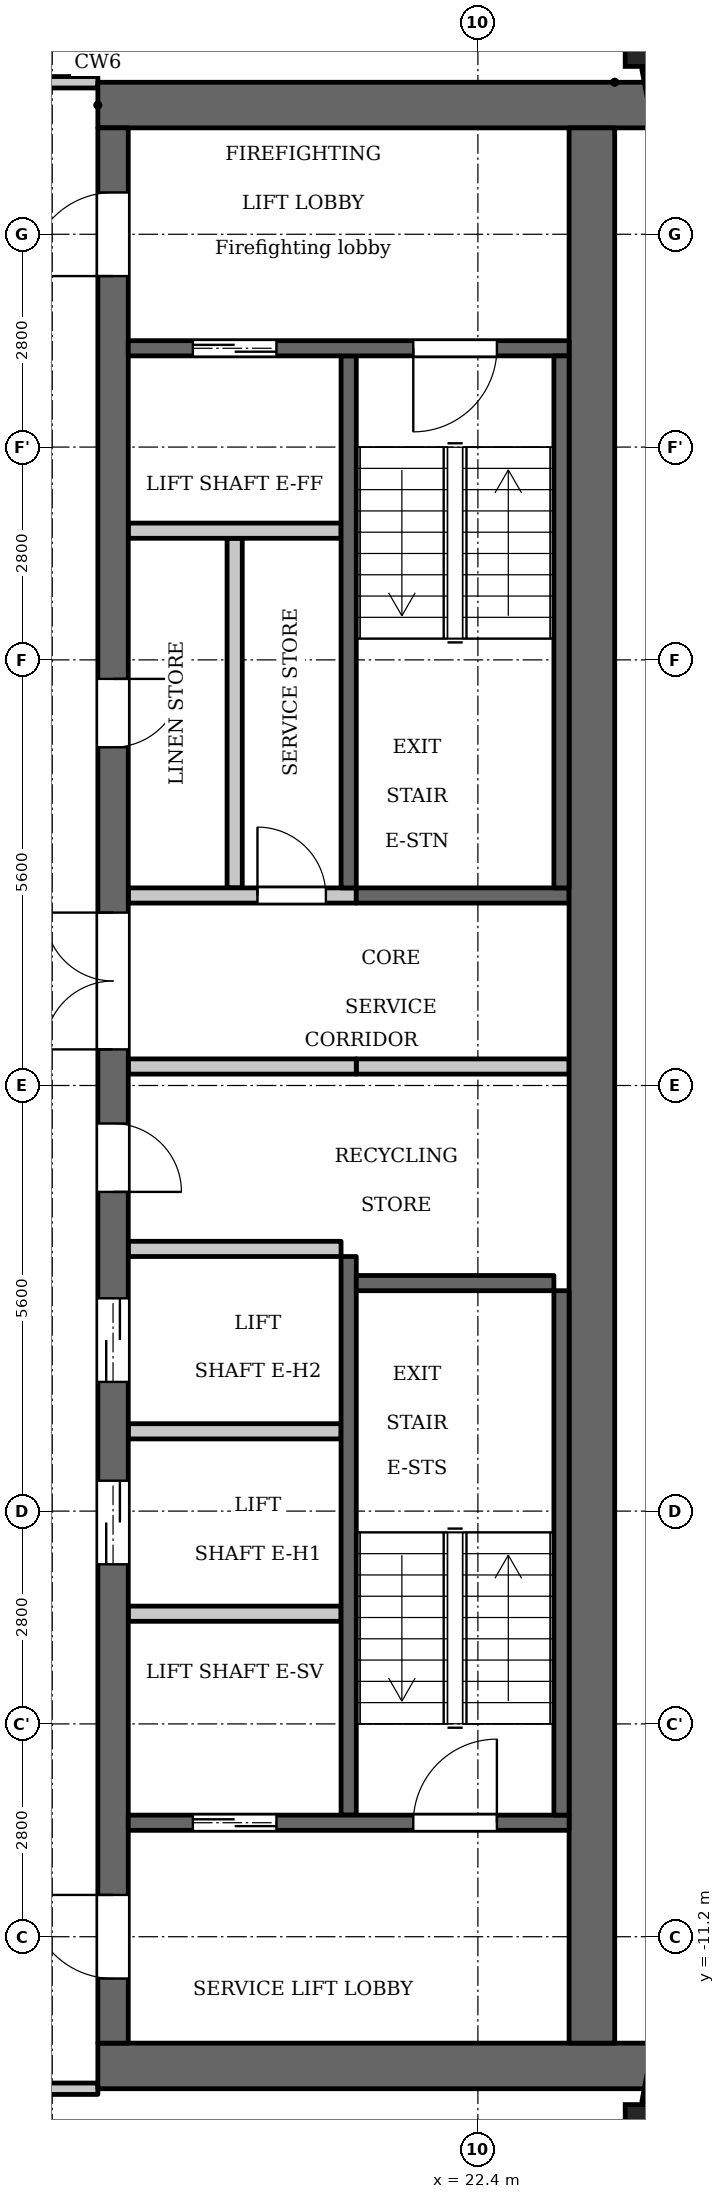
"""IFC4 building model, lengths in metres.
Left out: names, types, materials, properties, quantities, classifications, styles, units other than length and angle.
Written with IfcOpenShell. Run it as: python <this file> out.ifc"""

import sys

from ifc_helpers import new_model, si_unit, direction, frame, frame_2d, origin, origin_2d, place, context, subcontext, project, spatial, rectangle, extrude, element, fill, save


model = new_model("IFC4")
c1 = context("Model", 3, precision=1e-05, world=origin(), true_north=direction((0.0, 1.0)))
c2 = subcontext(c1, "Body", "Model", "MODEL_VIEW")
j1 = project(units=[si_unit("LENGTHUNIT", "METRE"), si_unit("PLANEANGLEUNIT", "RADIAN")], contexts=[c1])
p1 = place(None, origin())
s1 = spatial("IfcSite", under=j1, at=p1, CompositionType="ELEMENT")
p2 = place(p1, origin())
s2 = spatial("IfcBuilding", under=s1, at=p2, CompositionType="ELEMENT")
p3 = place(p2, frame((0.0, 0.0, 262.7)))
s3 = spatial("IfcBuildingStorey", under=s2, at=p3, CompositionType="ELEMENT", Elevation=262.7)
for number, where, z_axis, x_axis in (
    (1, (24.738, -13.809, 0.0), (0.0, 0.0, 1.0), (1.0, 0.0, 0.0)),
    (2, (24.738, 13.809, 0.0), (0.0, 0.0, 1.0), (1.0, 0.0, 0.0)),
):
    element("IfcColumn", number, at=place(p3, frame(where, z_axis=z_axis, x_axis=x_axis)), inside=s3, PredefinedType="COLUMN", context=c2, shape_type="SweptSolid", body=[
        extrude(rectangle(XDim=0.8, YDim=0.8, at=origin_2d()), origin(), (0.0, 0.0, 1.0), 3.5),
    ])
for number, where, z_axis, x_axis in (
    (3, (24.705, -13.395, 0.0), (0.0, 0.0, 1.0), (0.187, 0.982, 0.0)),
    (4, (25.053, 11.572, 0.0), (0.0, 0.0, 1.0), (-0.187, 0.982, 0.0)),
):
    element("IfcWall", number, at=place(p3, frame(where, z_axis=z_axis, x_axis=x_axis)), inside=s3, PredefinedType="SOLIDWALL", context=c2, shape_type="SweptSolid", body=[
        extrude(rectangle(XDim=1.856, YDim=0.3, at=frame_2d((0.928, 0.0))), origin(), (0.0, 0.0, 1.0), 2.55),
    ])
p4 = place(p3, frame((20.7, 2.6, 0.0), z_axis=(0.0, 0.0, 1.0), x_axis=(0.0, 1.0, 0.0)))
e5 = element("IfcWall", 5, at=p4, inside=s3, PredefinedType="SHEAR", context=c2, shape_type="SweptSolid", body=[
    extrude(rectangle(XDim=7.0, YDim=0.2, at=frame_2d((3.5, 0.0))), origin(), (0.0, 0.0, 1.0), 3.2),
])
p5 = place(p3, frame((20.7, -9.6, 0.0), z_axis=(0.0, 0.0, 1.0), x_axis=(0.0, 1.0, 0.0)))
e6 = element("IfcWall", 6, at=p5, inside=s3, PredefinedType="SHEAR", context=c2, shape_type="SweptSolid", body=[
    extrude(rectangle(XDim=7.35, YDim=0.2, at=frame_2d((3.675, 0.0))), origin(), (0.0, 0.0, 1.0), 3.2),
])
p6 = place(p3, frame((20.8, 2.5, 0.0), z_axis=(0.0, 0.0, 1.0), x_axis=(1.0, 0.0, 0.0)))
e7 = element("IfcWall", 7, at=p6, inside=s3, PredefinedType="SHEAR", context=c2, shape_type="SweptSolid", body=[
    extrude(rectangle(XDim=2.8, YDim=0.2, at=frame_2d((1.4, 0.0))), origin(), (0.0, 0.0, 1.0), 3.2),
])
p7 = place(p3, frame((20.8, 0.25, 0.0), z_axis=(0.0, 0.0, 1.0), x_axis=(1.0, 0.0, 0.0)))
e8 = element("IfcWall", 8, at=p7, inside=s3, PredefinedType="PARTITIONING", context=c2, shape_type="SweptSolid", body=[
    extrude(rectangle(XDim=2.8, YDim=0.2, at=frame_2d((1.4, 0.0))), origin(), (0.0, 0.0, 1.0), 3.2),
])
for number, where, z_axis, x_axis in (
    (9, (17.4, 12.9, 0.0), (0.0, 0.0, 1.0), (1.0, 0.0, 0.0)),
    (10, (17.4, -12.9, 0.0), (0.0, 0.0, 1.0), (1.0, 0.0, 0.0)),
):
    element("IfcWall", number, at=place(p3, frame(where, z_axis=z_axis, x_axis=x_axis)), inside=s3, PredefinedType="SHEAR", context=c2, shape_type="SweptSolid", body=[
        extrude(rectangle(XDim=7.32, YDim=0.6, at=frame_2d((3.66, 0.0))), origin(), (0.0, 0.0, 1.0), 3.2),
    ])
p8 = place(p3, frame((19.2, 2.6, 0.0), z_axis=(0.0, 0.0, 1.0), x_axis=(0.0, 1.0, 0.0)))
e11 = element("IfcWall", 11, at=p8, inside=s3, PredefinedType="PARTITIONING", context=c2, shape_type="SweptSolid", body=[
    extrude(rectangle(XDim=4.6, YDim=0.2, at=frame_2d((2.3, 0.0))), origin(), (0.0, 0.0, 1.0), 3.2),
])
p9 = place(p3, frame((17.6, -12.6, 0.0), z_axis=(0.0, 0.0, 1.0), x_axis=(0.0, 1.0, 0.0)))
e12 = element("IfcWall", 12, at=p9, inside=s3, PredefinedType="SHEAR", context=c2, shape_type="SweptSolid", body=[
    extrude(rectangle(XDim=25.2, YDim=0.4, at=frame_2d((12.6, 0.0))), origin(), (0.0, 0.0, 1.0), 3.2),
])
p10 = place(p9, frame((6.3, 0.0, 0.0)))
e13 = element("IfcOpeningElement", 13, at=p10, cuts=e12, PredefinedType="OPENING", context=c2, shape_type="SweptSolid", body=[
    extrude(rectangle(XDim=1.1, YDim=2.1, at=frame_2d((0.55, 1.05))), frame((0.0, 0.21, 0.0), z_axis=(0.0, -1.0, 0.0), x_axis=(1.0, 0.0, 0.0)), (0.0, 0.0, 1.0), 0.42),
])
p11 = place(p9, frame((8.7, 0.0, 0.0)))
e14 = element("IfcOpeningElement", 14, at=p11, cuts=e12, PredefinedType="OPENING", context=c2, shape_type="SweptSolid", body=[
    extrude(rectangle(XDim=1.1, YDim=2.1, at=frame_2d((0.55, 1.05))), frame((0.0, 0.21, 0.0), z_axis=(0.0, -1.0, 0.0), x_axis=(1.0, 0.0, 0.0)), (0.0, 0.0, 1.0), 0.42),
])
p12 = place(p9, frame((11.2, 0.0, 0.0)))
e15 = element("IfcOpeningElement", 15, at=p12, cuts=e12, PredefinedType="OPENING", context=c2, shape_type="SweptSolid", body=[
    extrude(rectangle(XDim=0.9, YDim=2.1, at=frame_2d((0.45, 1.05))), frame((0.0, 0.21, 0.0), z_axis=(0.0, -1.0, 0.0), x_axis=(1.0, 0.0, 0.0)), (0.0, 0.0, 1.0), 0.42),
])
p13 = place(p9, frame((17.05, 0.0, 0.0)))
e16 = element("IfcOpeningElement", 16, at=p13, cuts=e12, PredefinedType="OPENING", context=c2, shape_type="SweptSolid", body=[
    extrude(rectangle(XDim=0.9, YDim=2.1, at=frame_2d((0.45, 1.05))), frame((0.0, 0.21, 0.0), z_axis=(0.0, -1.0, 0.0), x_axis=(1.0, 0.0, 0.0)), (0.0, 0.0, 1.0), 0.42),
])
p14 = place(p9, frame((23.25, 0.0, 0.0)))
e17 = element("IfcOpeningElement", 17, at=p14, cuts=e12, PredefinedType="OPENING", context=c2, shape_type="SweptSolid", body=[
    extrude(rectangle(XDim=1.1, YDim=2.1, at=frame_2d((0.55, 1.05))), frame((0.0, 0.21, 0.0), z_axis=(0.0, -1.0, 0.0), x_axis=(1.0, 0.0, 0.0)), (0.0, 0.0, 1.0), 0.42),
])
p15 = place(p9, frame((0.85, 0.0, 0.0)))
e18 = element("IfcOpeningElement", 18, at=p15, cuts=e12, PredefinedType="OPENING", context=c2, shape_type="SweptSolid", body=[
    extrude(rectangle(XDim=1.1, YDim=2.1, at=frame_2d((0.55, 1.05))), frame((0.0, 0.21, 0.0), z_axis=(0.0, -1.0, 0.0), x_axis=(1.0, 0.0, 0.0)), (0.0, 0.0, 1.0), 0.42),
])
p16 = place(p9, frame((13.075, 0.0, 0.0)))
e19 = element("IfcOpeningElement", 19, at=p16, cuts=e12, PredefinedType="OPENING", context=c2, shape_type="SweptSolid", body=[
    extrude(rectangle(XDim=1.8, YDim=2.1, at=frame_2d((0.9, 1.05))), frame((0.0, 0.21, 0.0), z_axis=(0.0, -1.0, 0.0), x_axis=(1.0, 0.0, 0.0)), (0.0, 0.0, 1.0), 0.42),
])
p17 = place(p3, frame((23.9, -12.6, 0.0), z_axis=(0.0, 0.0, 1.0), x_axis=(0.0, 1.0, 0.0)))
e20 = element("IfcWall", 20, at=p17, inside=s3, PredefinedType="SHEAR", context=c2, shape_type="SweptSolid", body=[
    extrude(rectangle(XDim=25.2, YDim=0.6, at=frame_2d((12.6, 0.0))), origin(), (0.0, 0.0, 1.0), 3.2),
])
p18 = place(p3, frame((17.8, -9.7, 0.0), z_axis=(0.0, 0.0, 1.0), x_axis=(1.0, 0.0, 0.0)))
e21 = element("IfcWall", 21, at=p18, inside=s3, PredefinedType="SHEAR", context=c2, shape_type="SweptSolid", body=[
    extrude(rectangle(XDim=5.8, YDim=0.2, at=frame_2d((2.9, 0.0))), origin(), (0.0, 0.0, 1.0), 3.2),
])
p19 = place(p18, frame((0.85, 0.0, 0.0)))
e22 = element("IfcOpeningElement", 22, at=p19, cuts=e21, PredefinedType="OPENING", context=c2, shape_type="SweptSolid", body=[
    extrude(rectangle(XDim=1.1, YDim=2.1, at=frame_2d((0.55, 1.05))), frame((0.0, 0.11, 0.0), z_axis=(0.0, -1.0, 0.0), x_axis=(1.0, 0.0, 0.0)), (0.0, 0.0, 1.0), 0.22),
])
p20 = place(p18, frame((3.75, 0.0, 0.0)))
e23 = element("IfcOpeningElement", 23, at=p20, cuts=e21, PredefinedType="OPENING", context=c2, shape_type="SweptSolid", body=[
    extrude(rectangle(XDim=1.1, YDim=2.1, at=frame_2d((0.55, 1.05))), frame((0.0, 0.11, 0.0), z_axis=(0.0, -1.0, 0.0), x_axis=(1.0, 0.0, 0.0)), (0.0, 0.0, 1.0), 0.22),
])
for number, where, z_axis, x_axis in (
    (24, (17.8, -6.95, 0.0), (0.0, 0.0, 1.0), (1.0, 0.0, 0.0)),
    (25, (17.8, -4.55, 0.0), (0.0, 0.0, 1.0), (1.0, 0.0, 0.0)),
    (26, (17.8, -2.15, 0.0), (0.0, 0.0, 1.0), (1.0, 0.0, 0.0)),
):
    element("IfcWall", number, at=place(p3, frame(where, z_axis=z_axis, x_axis=x_axis)), inside=s3, PredefinedType="PARTITIONING", context=c2, shape_type="SweptSolid", body=[
        extrude(rectangle(XDim=2.8, YDim=0.2, at=frame_2d((1.4, 0.0))), origin(), (0.0, 0.0, 1.0), 3.2),
    ])
p21 = place(p3, frame((17.8, 0.25, 0.0), z_axis=(0.0, 0.0, 1.0), x_axis=(1.0, 0.0, 0.0)))
e27 = element("IfcWall", 27, at=p21, inside=s3, PredefinedType="PARTITIONING", context=c2, shape_type="SweptSolid", body=[
    extrude(rectangle(XDim=3.0, YDim=0.2, at=frame_2d((1.5, 0.0))), origin(), (0.0, 0.0, 1.0), 3.2),
])
p22 = place(p3, frame((17.8, 2.5, 0.0), z_axis=(0.0, 0.0, 1.0), x_axis=(1.0, 0.0, 0.0)))
e28 = element("IfcWall", 28, at=p22, inside=s3, PredefinedType="PARTITIONING", context=c2, shape_type="SweptSolid", body=[
    extrude(rectangle(XDim=3.0, YDim=0.2, at=frame_2d((1.5, 0.0))), origin(), (0.0, 0.0, 1.0), 3.2),
])
p23 = place(p22, frame((1.7, 0.0, 0.0)))
e29 = element("IfcOpeningElement", 29, at=p23, cuts=e28, PredefinedType="OPENING", context=c2, shape_type="SweptSolid", body=[
    extrude(rectangle(XDim=0.9, YDim=2.1, at=frame_2d((0.45, 1.05))), frame((0.0, 0.11, 0.0), z_axis=(0.0, -1.0, 0.0), x_axis=(1.0, 0.0, 0.0)), (0.0, 0.0, 1.0), 0.22),
])
p24 = place(p3, frame((17.8, 7.3, 0.0), z_axis=(0.0, 0.0, 1.0), x_axis=(1.0, 0.0, 0.0)))
e30 = element("IfcWall", 30, at=p24, inside=s3, PredefinedType="PARTITIONING", context=c2, shape_type="SweptSolid", body=[
    extrude(rectangle(XDim=2.8, YDim=0.2, at=frame_2d((1.4, 0.0))), origin(), (0.0, 0.0, 1.0), 3.2),
])
p25 = place(p3, frame((17.8, 9.7, 0.0), z_axis=(0.0, 0.0, 1.0), x_axis=(1.0, 0.0, 0.0)))
e31 = element("IfcWall", 31, at=p25, inside=s3, PredefinedType="SHEAR", context=c2, shape_type="SweptSolid", body=[
    extrude(rectangle(XDim=5.8, YDim=0.2, at=frame_2d((2.9, 0.0))), origin(), (0.0, 0.0, 1.0), 3.2),
])
p26 = place(p25, frame((0.85, 0.0, 0.0)))
e32 = element("IfcOpeningElement", 32, at=p26, cuts=e31, PredefinedType="OPENING", context=c2, shape_type="SweptSolid", body=[
    extrude(rectangle(XDim=1.1, YDim=2.1, at=frame_2d((0.55, 1.05))), frame((0.0, 0.11, 0.0), z_axis=(0.0, -1.0, 0.0), x_axis=(1.0, 0.0, 0.0)), (0.0, 0.0, 1.0), 0.22),
])
p27 = place(p25, frame((3.75, 0.0, 0.0)))
e33 = element("IfcOpeningElement", 33, at=p27, cuts=e31, PredefinedType="OPENING", context=c2, shape_type="SweptSolid", body=[
    extrude(rectangle(XDim=1.1, YDim=2.1, at=frame_2d((0.55, 1.05))), frame((0.0, 0.11, 0.0), z_axis=(0.0, -1.0, 0.0), x_axis=(1.0, 0.0, 0.0)), (0.0, 0.0, 1.0), 0.22),
])
p28 = place(p3, frame((23.5, 2.6, 0.0), z_axis=(0.0, 0.0, 1.0), x_axis=(0.0, 1.0, 0.0)))
e34 = element("IfcWall", 34, at=p28, inside=s3, PredefinedType="SHEAR", context=c2, shape_type="SweptSolid", body=[
    extrude(rectangle(XDim=7.0, YDim=0.2, at=frame_2d((3.5, 0.0))), origin(), (0.0, 0.0, 1.0), 3.2),
])
p29 = place(p3, frame((23.5, -9.6, 0.0), z_axis=(0.0, 0.0, 1.0), x_axis=(0.0, 1.0, 0.0)))
e35 = element("IfcWall", 35, at=p29, inside=s3, PredefinedType="SHEAR", context=c2, shape_type="SweptSolid", body=[
    extrude(rectangle(XDim=6.9, YDim=0.2, at=frame_2d((3.45, 0.0))), origin(), (0.0, 0.0, 1.0), 3.2),
])
p30 = place(p3, frame((20.8, -2.6, 0.0), z_axis=(0.0, 0.0, 1.0), x_axis=(1.0, 0.0, 0.0)))
e36 = element("IfcWall", 36, at=p30, inside=s3, PredefinedType="SHEAR", context=c2, shape_type="SweptSolid", body=[
    extrude(rectangle(XDim=2.6, YDim=0.2, at=frame_2d((1.3, 0.0))), origin(), (0.0, 0.0, 1.0), 3.2),
])
p31 = place(p3, frame((15.075, -13.2, 0.0), z_axis=(0.0, 0.0, 1.0), x_axis=(1.0, 0.0, 0.0)))
e37 = element("IfcWall", 37, at=p31, inside=s3, PredefinedType="PARTITIONING", context=c2, shape_type="SweptSolid", body=[
    extrude(rectangle(XDim=2.325, YDim=0.15, at=frame_2d((1.163, 0.0))), origin(), (0.0, 0.0, 1.0), 3.2),
])
p32 = place(p31, frame((0.575, 0.0, 0.0)))
e38 = element("IfcOpeningElement", 38, at=p32, cuts=e37, PredefinedType="OPENING", context=c2, shape_type="SweptSolid", body=[
    extrude(rectangle(XDim=1.0, YDim=2.1, at=frame_2d((0.5, 1.05))), frame((0.0, 0.085, 0.0), z_axis=(0.0, -1.0, 0.0), x_axis=(1.0, 0.0, 0.0)), (0.0, 0.0, 1.0), 0.17),
])
p33 = place(p3, frame((15.075, 13.2, 0.0), z_axis=(0.0, 0.0, 1.0), x_axis=(1.0, 0.0, 0.0)))
e39 = element("IfcWall", 39, at=p33, inside=s3, PredefinedType="PARTITIONING", context=c2, shape_type="SweptSolid", body=[
    extrude(rectangle(XDim=2.325, YDim=0.15, at=frame_2d((1.163, 0.0))), origin(), (0.0, 0.0, 1.0), 3.2),
])
p34 = place(p33, frame((0.675, 0.0, 0.0)))
e40 = element("IfcOpeningElement", 40, at=p34, cuts=e39, PredefinedType="OPENING", context=c2, shape_type="SweptSolid", body=[
    extrude(rectangle(XDim=1.0, YDim=2.1, at=frame_2d((0.5, 1.05))), frame((0.0, 0.085, 0.0), z_axis=(0.0, -1.0, 0.0), x_axis=(1.0, 0.0, 0.0)), (0.0, 0.0, 1.0), 0.17),
])
p35 = place(p19, origin())
e41 = element("IfcDoor", 41, at=p35, inside=s3, OperationType="DOUBLE_DOOR_SLIDING", PredefinedType="DOOR", context=c2, shape_type="SweptSolid", body=[
    extrude(rectangle(XDim=1.1, YDim=2.1, at=frame_2d((0.55, 1.05))), frame((0.0, 0.025, 0.0), z_axis=(0.0, -1.0, 0.0), x_axis=(1.0, 0.0, 0.0)), (0.0, 0.0, 1.0), 0.05),
])
fill(e22, e41)
p36 = place(p10, origin())
e42 = element("IfcDoor", 42, at=p36, inside=s3, OperationType="DOUBLE_DOOR_SLIDING", PredefinedType="DOOR", context=c2, shape_type="SweptSolid", body=[
    extrude(rectangle(XDim=1.1, YDim=2.1, at=frame_2d((0.55, 1.05))), frame((0.0, 0.025, 0.0), z_axis=(0.0, -1.0, 0.0), x_axis=(1.0, 0.0, 0.0)), (0.0, 0.0, 1.0), 0.05),
])
fill(e13, e42)
p37 = place(p11, origin())
e43 = element("IfcDoor", 43, at=p37, inside=s3, OperationType="DOUBLE_DOOR_SLIDING", PredefinedType="DOOR", context=c2, shape_type="SweptSolid", body=[
    extrude(rectangle(XDim=1.1, YDim=2.1, at=frame_2d((0.55, 1.05))), frame((0.0, 0.025, 0.0), z_axis=(0.0, -1.0, 0.0), x_axis=(1.0, 0.0, 0.0)), (0.0, 0.0, 1.0), 0.05),
])
fill(e14, e43)
p38 = place(p12, origin())
e44 = element("IfcDoor", 44, at=p38, inside=s3, OperationType="SINGLE_SWING_LEFT", PredefinedType="DOOR", context=c2, shape_type="SweptSolid", body=[
    extrude(rectangle(XDim=0.9, YDim=2.1, at=frame_2d((0.45, 1.05))), frame((0.0, 0.025, 0.0), z_axis=(0.0, -1.0, 0.0), x_axis=(1.0, 0.0, 0.0)), (0.0, 0.0, 1.0), 0.05),
])
fill(e15, e44)
p39 = place(p13, origin())
e45 = element("IfcDoor", 45, at=p39, inside=s3, OperationType="SINGLE_SWING_RIGHT", PredefinedType="DOOR", context=c2, shape_type="SweptSolid", body=[
    extrude(rectangle(XDim=0.9, YDim=2.1, at=frame_2d((0.45, 1.05))), frame((0.0, 0.025, 0.0), z_axis=(0.0, -1.0, 0.0), x_axis=(1.0, 0.0, 0.0)), (0.0, 0.0, 1.0), 0.05),
])
fill(e16, e45)
p40 = place(p23, origin())
e46 = element("IfcDoor", 46, at=p40, inside=s3, OperationType="SINGLE_SWING_RIGHT", PredefinedType="DOOR", context=c2, shape_type="SweptSolid", body=[
    extrude(rectangle(XDim=0.9, YDim=2.1, at=frame_2d((0.45, 1.05))), frame((0.0, 0.025, 0.0), z_axis=(0.0, -1.0, 0.0), x_axis=(1.0, 0.0, 0.0)), (0.0, 0.0, 1.0), 0.05),
])
fill(e29, e46)
p41 = place(p26, origin())
e47 = element("IfcDoor", 47, at=p41, inside=s3, OperationType="DOUBLE_DOOR_SLIDING", PredefinedType="DOOR", context=c2, shape_type="SweptSolid", body=[
    extrude(rectangle(XDim=1.1, YDim=2.1, at=frame_2d((0.55, 1.05))), frame((0.0, 0.025, 0.0), z_axis=(0.0, -1.0, 0.0), x_axis=(1.0, 0.0, 0.0)), (0.0, 0.0, 1.0), 0.05),
])
fill(e32, e47)
p42 = place(p14, origin())
e48 = element("IfcDoor", 48, at=p42, inside=s3, OperationType="SINGLE_SWING_RIGHT", PredefinedType="DOOR", context=c2, shape_type="SweptSolid", body=[
    extrude(rectangle(XDim=1.1, YDim=2.1, at=frame_2d((0.55, 1.05))), frame((0.0, 0.025, 0.0), z_axis=(0.0, -1.0, 0.0), x_axis=(1.0, 0.0, 0.0)), (0.0, 0.0, 1.0), 0.05),
])
fill(e17, e48)
p43 = place(p15, origin())
e49 = element("IfcDoor", 49, at=p43, inside=s3, OperationType="SINGLE_SWING_LEFT", PredefinedType="DOOR", context=c2, shape_type="SweptSolid", body=[
    extrude(rectangle(XDim=1.1, YDim=2.1, at=frame_2d((0.55, 1.05))), frame((0.0, 0.025, 0.0), z_axis=(0.0, -1.0, 0.0), x_axis=(1.0, 0.0, 0.0)), (0.0, 0.0, 1.0), 0.05),
])
fill(e18, e49)
p44 = place(p27, origin())
e50 = element("IfcDoor", 50, at=p44, inside=s3, OperationType="SINGLE_SWING_LEFT", PredefinedType="DOOR", context=c2, shape_type="SweptSolid", body=[
    extrude(rectangle(XDim=1.1, YDim=2.1, at=frame_2d((0.55, 1.05))), frame((0.0, 0.025, 0.0), z_axis=(0.0, -1.0, 0.0), x_axis=(1.0, 0.0, 0.0)), (0.0, 0.0, 1.0), 0.05),
])
fill(e33, e50)
p45 = place(p20, origin())
e51 = element("IfcDoor", 51, at=p45, inside=s3, OperationType="SINGLE_SWING_LEFT", PredefinedType="DOOR", context=c2, shape_type="SweptSolid", body=[
    extrude(rectangle(XDim=1.1, YDim=2.1, at=frame_2d((0.55, 1.05))), frame((0.0, 0.025, 0.0), z_axis=(0.0, -1.0, 0.0), x_axis=(1.0, 0.0, 0.0)), (0.0, 0.0, 1.0), 0.05),
])
fill(e23, e51)
p46 = place(p16, origin())
e52 = element("IfcDoor", 52, at=p46, inside=s3, OperationType="DOUBLE_DOOR_SINGLE_SWING", PredefinedType="DOOR", context=c2, shape_type="SweptSolid", body=[
    extrude(rectangle(XDim=1.8, YDim=2.1, at=frame_2d((0.9, 1.05))), frame((0.0, 0.025, 0.0), z_axis=(0.0, -1.0, 0.0), x_axis=(1.0, 0.0, 0.0)), (0.0, 0.0, 1.0), 0.05),
])
fill(e19, e52)
save(model, sys.argv[1])
